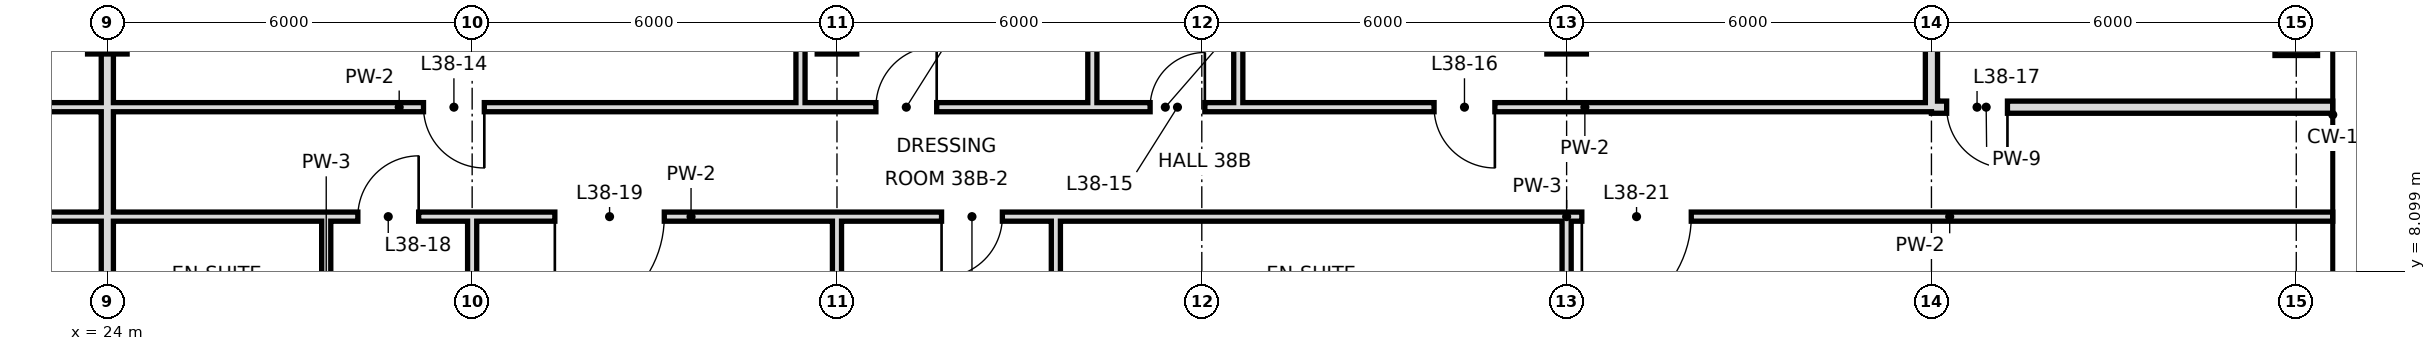
"""IFC4 building model, lengths in metres.
Left out: names, types, materials, properties, quantities, classifications, styles, units other than length and angle.
Written with IfcOpenShell. Run it as: python <this file> out.ifc"""

import sys

from ifc_helpers import new_model, si_unit, direction, frame, frame_2d, origin, origin_2d, place, context, subcontext, project, spatial, rectangle, hollow_rectangle, extrude, element, fill, save


model = new_model("IFC4")
c1 = context("Model", 3, precision=1e-05, world=origin(), true_north=direction((0.0, 1.0)))
c2 = subcontext(c1, "Body", "Model", "MODEL_VIEW")
j1 = project(units=[si_unit("LENGTHUNIT", "METRE"), si_unit("PLANEANGLEUNIT", "RADIAN")], contexts=[c1])
p1 = place(None, origin())
s1 = spatial("IfcSite", under=j1, at=p1, CompositionType="ELEMENT")
p2 = place(p1, origin())
s2 = spatial("IfcBuilding", under=s1, at=p2, CompositionType="ELEMENT")
p3 = place(p2, frame((0.0, 0.0, 167.2)))
s3 = spatial("IfcBuildingStorey", under=s2, at=p3, CompositionType="ELEMENT", Elevation=167.2)
for number, where, z_axis, x_axis in (
    (1, (24.0, 12.0, 0.0), (0.0, 0.0, 1.0), (1.0, 0.0, 0.0)),
    (2, (36.0, 12.0, 0.0), (0.0, 0.0, 1.0), (1.0, 0.0, 0.0)),
    (3, (48.0, 12.0, 0.0), (0.0, 0.0, 1.0), (1.0, 0.0, 0.0)),
):
    element("IfcColumn", number, at=place(p3, frame(where, z_axis=z_axis, x_axis=x_axis)), inside=s3, PredefinedType="COLUMN", context=c2, shape_type="SweptSolid", body=[
        extrude(hollow_rectangle(XDim=0.65, YDim=0.65, WallThickness=0.032, at=origin_2d()), origin(), (0.0, 0.0, 1.0), 3.6),
    ])
p4 = place(p3, frame((60.0, 12.0, 0.0), z_axis=(0.0, 0.0, 1.0), x_axis=(1.0, 0.0, 0.0)))
e4 = element("IfcColumn", 4, at=p4, inside=s3, PredefinedType="COLUMN", context=c2, shape_type="SweptSolid", body=[
    extrude(hollow_rectangle(XDim=0.7, YDim=0.7, WallThickness=0.036, at=origin_2d()), origin(), (0.0, 0.0, 1.0), 3.6),
])
p5 = place(p3, frame((24.0, 0.0, 0.0), z_axis=(0.0, 0.0, 1.0), x_axis=(0.0, 1.0, 0.0)))
e5 = element("IfcWall", 5, at=p5, inside=s3, PredefinedType="SOLIDWALL", context=c2, shape_type="SweptSolid", body=[
    extrude(rectangle(XDim=15.3, YDim=0.2, at=frame_2d((7.65, 0.0))), origin(), (0.0, 0.0, 1.0), 2.72),
])
p6 = place(p3, frame((27.6, 6.0, 0.0), z_axis=(0.0, 0.0, 1.0), x_axis=(0.0, 1.0, 0.0)))
e6 = element("IfcWall", 6, at=p6, inside=s3, PredefinedType="PARTITIONING", context=c2, shape_type="SweptSolid", body=[
    extrude(rectangle(XDim=3.0, YDim=0.15, at=frame_2d((1.5, 0.0))), origin(), (0.0, 0.0, 1.0), 3.42),
])
p7 = place(p3, frame((30.0, -0.6, 0.0), z_axis=(0.0, 0.0, 1.0), x_axis=(0.0, 1.0, 0.0)))
e7 = element("IfcWall", 7, at=p7, inside=s3, PredefinedType="PARTITIONING", context=c2, shape_type="SweptSolid", body=[
    extrude(rectangle(XDim=9.6, YDim=0.15, at=frame_2d((4.8, 0.0))), origin(), (0.0, 0.0, 1.0), 2.72),
])
p8 = place(p3, frame((35.4, 10.8, 0.0), z_axis=(0.0, 0.0, 1.0), x_axis=(0.0, 1.0, 0.0)))
e8 = element("IfcWall", 8, at=p8, inside=s3, PredefinedType="PARTITIONING", context=c2, shape_type="SweptSolid", body=[
    extrude(rectangle(XDim=4.5, YDim=0.15, at=frame_2d((2.25, 0.0))), origin(), (0.0, 0.0, 1.0), 3.42),
])
p9 = place(p3, frame((36.0, 0.0, 0.0), z_axis=(0.0, 0.0, 1.0), x_axis=(0.0, 1.0, 0.0)))
e9 = element("IfcWall", 9, at=p9, inside=s3, PredefinedType="PARTITIONING", context=c2, shape_type="SweptSolid", body=[
    extrude(rectangle(XDim=9.0, YDim=0.15, at=frame_2d((4.5, 0.0))), origin(), (0.0, 0.0, 1.0), 2.72),
])
p10 = place(p3, frame((39.6, 6.0, 0.0), z_axis=(0.0, 0.0, 1.0), x_axis=(0.0, 1.0, 0.0)))
e10 = element("IfcWall", 10, at=p10, inside=s3, PredefinedType="PARTITIONING", context=c2, shape_type="SweptSolid", body=[
    extrude(rectangle(XDim=3.0, YDim=0.15, at=frame_2d((1.5, 0.0))), origin(), (0.0, 0.0, 1.0), 3.42),
])
for number, where, z_axis, x_axis in (
    (11, (40.2, 10.8, 0.0), (0.0, 0.0, 1.0), (0.0, 1.0, 0.0)),
    (12, (42.6, 10.8, 0.0), (0.0, 0.0, 1.0), (0.0, 1.0, 0.0)),
):
    element("IfcWall", number, at=place(p3, frame(where, z_axis=z_axis, x_axis=x_axis)), inside=s3, PredefinedType="PARTITIONING", context=c2, shape_type="SweptSolid", body=[
        extrude(rectangle(XDim=4.5, YDim=0.15, at=frame_2d((2.25, 0.0))), origin(), (0.0, 0.0, 1.0), 3.42),
    ])
p11 = place(p3, frame((48.0, 6.0, 0.0), z_axis=(0.0, 0.0, 1.0), x_axis=(0.0, 1.0, 0.0)))
e13 = element("IfcWall", 13, at=p11, inside=s3, PredefinedType="PARTITIONING", context=c2, shape_type="SweptSolid", body=[
    extrude(rectangle(XDim=3.0, YDim=0.15, at=frame_2d((1.5, 0.0))), origin(), (0.0, 0.0, 1.0), 2.72),
])
p12 = place(p3, frame((54.0, 10.8, 0.0), z_axis=(0.0, 0.0, 1.0), x_axis=(0.0, 1.0, 0.0)))
e14 = element("IfcWall", 14, at=p12, inside=s3, PredefinedType="SOLIDWALL", context=c2, shape_type="SweptSolid", body=[
    extrude(rectangle(XDim=4.8, YDim=0.2, at=frame_2d((2.4, 0.0))), origin(), (0.0, 0.0, 1.0), 2.72),
])
p13 = place(p3, frame((54.0, 10.8, 0.0), z_axis=(0.0, 0.0, 1.0), x_axis=(1.0, 0.0, 0.0)))
e15 = element("IfcWall", 15, at=p13, inside=s3, PredefinedType="SOLIDWALL", context=c2, shape_type="SweptSolid", body=[
    extrude(rectangle(XDim=6.6, YDim=0.2, at=frame_2d((3.3, 0.0))), origin(), (0.0, 0.0, 1.0), 2.97),
])
p14 = place(p13, frame((0.25, 0.0, 0.0)))
e16 = element("IfcOpeningElement", 16, at=p14, cuts=e15, PredefinedType="OPENING", context=c2, shape_type="SweptSolid", body=[
    extrude(rectangle(XDim=1.0, YDim=2.4, at=frame_2d((0.5, 1.2))), frame((0.0, 0.11, 0.0), z_axis=(0.0, -1.0, 0.0), x_axis=(1.0, 0.0, 0.0)), (0.0, 0.0, 1.0), 0.22),
])
p15 = place(p3, frame((17.4, 10.8, 0.0), z_axis=(0.0, 0.0, 1.0), x_axis=(1.0, 0.0, 0.0)))
e17 = element("IfcWall", 17, at=p15, inside=s3, PredefinedType="PARTITIONING", context=c2, shape_type="SweptSolid", body=[
    extrude(rectangle(XDim=22.8, YDim=0.15, at=frame_2d((11.4, 0.0))), origin(), (0.0, 0.0, 1.0), 3.42),
])
p16 = place(p15, frame((2.8, 0.0, 0.0)))
e18 = element("IfcOpeningElement", 18, at=p16, cuts=e17, PredefinedType="OPENING", context=c2, shape_type="SweptSolid", body=[
    extrude(rectangle(XDim=1.0, YDim=2.4, at=frame_2d((0.5, 1.2))), frame((0.0, 0.085, 0.0), z_axis=(0.0, -1.0, 0.0), x_axis=(1.0, 0.0, 0.0)), (0.0, 0.0, 1.0), 0.17),
])
p17 = place(p15, frame((19.24, 0.0, 0.0)))
e19 = element("IfcOpeningElement", 19, at=p17, cuts=e17, PredefinedType="OPENING", context=c2, shape_type="SweptSolid", body=[
    extrude(rectangle(XDim=1.0, YDim=2.4, at=frame_2d((0.5, 1.2))), frame((0.0, 0.085, 0.0), z_axis=(0.0, -1.0, 0.0), x_axis=(1.0, 0.0, 0.0)), (0.0, 0.0, 1.0), 0.17),
])
p18 = place(p15, frame((11.8, 0.0, 0.0)))
e20 = element("IfcOpeningElement", 20, at=p18, cuts=e17, PredefinedType="OPENING", context=c2, shape_type="SweptSolid", body=[
    extrude(rectangle(XDim=1.0, YDim=2.4, at=frame_2d((0.5, 1.2))), frame((0.0, 0.085, 0.0), z_axis=(0.0, -1.0, 0.0), x_axis=(1.0, 0.0, 0.0)), (0.0, 0.0, 1.0), 0.17),
])
p19 = place(p3, frame((42.6, 10.8, 0.0), z_axis=(0.0, 0.0, 1.0), x_axis=(1.0, 0.0, 0.0)))
e21 = element("IfcWall", 21, at=p19, inside=s3, PredefinedType="PARTITIONING", context=c2, shape_type="SweptSolid", body=[
    extrude(rectangle(XDim=11.4, YDim=0.15, at=frame_2d((5.7, 0.0))), origin(), (0.0, 0.0, 1.0), 3.42),
])
p20 = place(p19, frame((3.22, 0.0, 0.0)))
e22 = element("IfcOpeningElement", 22, at=p20, cuts=e21, PredefinedType="OPENING", context=c2, shape_type="SweptSolid", body=[
    extrude(rectangle(XDim=1.0, YDim=2.4, at=frame_2d((0.5, 1.2))), frame((0.0, 0.085, 0.0), z_axis=(0.0, -1.0, 0.0), x_axis=(1.0, 0.0, 0.0)), (0.0, 0.0, 1.0), 0.17),
])
p21 = place(p3, frame((40.2, 10.8, 0.0), z_axis=(0.0, 0.0, 1.0), x_axis=(1.0, 0.0, 0.0)))
e23 = element("IfcWall", 23, at=p21, inside=s3, PredefinedType="PARTITIONING", context=c2, shape_type="SweptSolid", body=[
    extrude(rectangle(XDim=2.4, YDim=0.15, at=frame_2d((1.2, 0.0))), origin(), (0.0, 0.0, 1.0), 3.42),
])
p22 = place(p21, frame((0.95, 0.0, 0.0)))
e24 = element("IfcOpeningElement", 24, at=p22, cuts=e23, PredefinedType="OPENING", context=c2, shape_type="SweptSolid", body=[
    extrude(rectangle(XDim=0.9, YDim=2.4, at=frame_2d((0.45, 1.2))), frame((0.0, 0.085, 0.0), z_axis=(0.0, -1.0, 0.0), x_axis=(1.0, 0.0, 0.0)), (0.0, 0.0, 1.0), 0.17),
])
p23 = place(p3, frame((6.0, 9.0, 0.0), z_axis=(0.0, 0.0, 1.0), x_axis=(1.0, 0.0, 0.0)))
e25 = element("IfcWall", 25, at=p23, inside=s3, PredefinedType="PARTITIONING", context=c2, shape_type="SweptSolid", body=[
    extrude(rectangle(XDim=18.0, YDim=0.15, at=frame_2d((9.0, 0.0))), origin(), (0.0, 0.0, 1.0), 3.42),
])
p24 = place(p23, frame((3.4, 0.0, 0.0)))
e26 = element("IfcOpeningElement", 26, at=p24, cuts=e25, PredefinedType="OPENING", context=c2, shape_type="SweptSolid", body=[
    extrude(rectangle(XDim=1.0, YDim=2.4, at=frame_2d((0.5, 1.2))), frame((0.0, 0.085, 0.0), z_axis=(0.0, -1.0, 0.0), x_axis=(1.0, 0.0, 0.0)), (0.0, 0.0, 1.0), 0.17),
])
p25 = place(p23, frame((9.16, 0.0, 0.0)))
e27 = element("IfcOpeningElement", 27, at=p25, cuts=e25, PredefinedType="OPENING", context=c2, shape_type="SweptSolid", body=[
    extrude(rectangle(XDim=1.8, YDim=2.4, at=frame_2d((0.9, 1.2))), frame((0.0, 0.085, 0.0), z_axis=(0.0, -1.0, 0.0), x_axis=(1.0, 0.0, 0.0)), (0.0, 0.0, 1.0), 0.17),
])
p26 = place(p3, frame((27.6, 9.0, 0.0), z_axis=(0.0, 0.0, 1.0), x_axis=(1.0, 0.0, 0.0)))
e28 = element("IfcWall", 28, at=p26, inside=s3, PredefinedType="PARTITIONING", context=c2, shape_type="SweptSolid", body=[
    extrude(rectangle(XDim=12.0, YDim=0.15, at=frame_2d((6.0, 0.0))), origin(), (0.0, 0.0, 1.0), 3.42),
])
p27 = place(p26, frame((0.52, 0.0, 0.0)))
e29 = element("IfcOpeningElement", 29, at=p27, cuts=e28, PredefinedType="OPENING", context=c2, shape_type="SweptSolid", body=[
    extrude(rectangle(XDim=1.0, YDim=2.4, at=frame_2d((0.5, 1.2))), frame((0.0, 0.085, 0.0), z_axis=(0.0, -1.0, 0.0), x_axis=(1.0, 0.0, 0.0)), (0.0, 0.0, 1.0), 0.17),
])
p28 = place(p26, frame((3.76, 0.0, 0.0)))
e30 = element("IfcOpeningElement", 30, at=p28, cuts=e28, PredefinedType="OPENING", context=c2, shape_type="SweptSolid", body=[
    extrude(rectangle(XDim=1.8, YDim=2.4, at=frame_2d((0.9, 1.2))), frame((0.0, 0.085, 0.0), z_axis=(0.0, -1.0, 0.0), x_axis=(1.0, 0.0, 0.0)), (0.0, 0.0, 1.0), 0.17),
])
p29 = place(p26, frame((10.12, 0.0, 0.0)))
e31 = element("IfcOpeningElement", 31, at=p29, cuts=e28, PredefinedType="OPENING", context=c2, shape_type="SweptSolid", body=[
    extrude(rectangle(XDim=1.0, YDim=2.4, at=frame_2d((0.5, 1.2))), frame((0.0, 0.085, 0.0), z_axis=(0.0, -1.0, 0.0), x_axis=(1.0, 0.0, 0.0)), (0.0, 0.0, 1.0), 0.17),
])
p30 = place(p3, frame((48.0, 9.0, 0.0), z_axis=(0.0, 0.0, 1.0), x_axis=(1.0, 0.0, 0.0)))
e32 = element("IfcWall", 32, at=p30, inside=s3, PredefinedType="PARTITIONING", context=c2, shape_type="SweptSolid", body=[
    extrude(rectangle(XDim=12.6, YDim=0.15, at=frame_2d((6.3, 0.0))), origin(), (0.0, 0.0, 1.0), 3.42),
])
p31 = place(p30, frame((0.25, 0.0, 0.0)))
e33 = element("IfcOpeningElement", 33, at=p31, cuts=e32, PredefinedType="OPENING", context=c2, shape_type="SweptSolid", body=[
    extrude(rectangle(XDim=1.8, YDim=2.4, at=frame_2d((0.9, 1.2))), frame((0.0, 0.085, 0.0), z_axis=(0.0, -1.0, 0.0), x_axis=(1.0, 0.0, 0.0)), (0.0, 0.0, 1.0), 0.17),
])
p32 = place(p3, frame((24.0, 9.0, 0.0), z_axis=(0.0, 0.0, 1.0), x_axis=(1.0, 0.0, 0.0)))
e34 = element("IfcWall", 34, at=p32, inside=s3, PredefinedType="PARTITIONING", context=c2, shape_type="SweptSolid", body=[
    extrude(rectangle(XDim=3.6, YDim=0.15, at=frame_2d((1.8, 0.0))), origin(), (0.0, 0.0, 1.0), 3.42),
])
p33 = place(p3, frame((39.6, 9.0, 0.0), z_axis=(0.0, 0.0, 1.0), x_axis=(1.0, 0.0, 0.0)))
e35 = element("IfcWall", 35, at=p33, inside=s3, PredefinedType="PARTITIONING", context=c2, shape_type="SweptSolid", body=[
    extrude(rectangle(XDim=8.4, YDim=0.15, at=frame_2d((4.2, 0.0))), origin(), (0.0, 0.0, 1.0), 3.42),
])
p34 = place(p17, frame((1.0, 0.0, 0.0), z_axis=(0.0, 0.0, 1.0), x_axis=(-1.0, 0.0, 0.0)))
e36 = element("IfcDoor", 36, at=p34, inside=s3, OperationType="SINGLE_SWING_LEFT", PredefinedType="DOOR", context=c2, shape_type="SweptSolid", body=[
    extrude(rectangle(XDim=1.0, YDim=2.4, at=frame_2d((0.5, 1.2))), frame((0.0, 0.025, 0.0), z_axis=(0.0, -1.0, 0.0), x_axis=(1.0, 0.0, 0.0)), (0.0, 0.0, 1.0), 0.05),
])
fill(e19, e36)
p35 = place(p18, origin())
e37 = element("IfcDoor", 37, at=p35, inside=s3, OperationType="SINGLE_SWING_RIGHT", PredefinedType="DOOR", context=c2, shape_type="SweptSolid", body=[
    extrude(rectangle(XDim=1.0, YDim=2.4, at=frame_2d((0.5, 1.2))), frame((0.0, 0.025, 0.0), z_axis=(0.0, -1.0, 0.0), x_axis=(1.0, 0.0, 0.0)), (0.0, 0.0, 1.0), 0.05),
])
fill(e20, e37)
p36 = place(p22, frame((0.9, 0.0, 0.0), z_axis=(0.0, 0.0, 1.0), x_axis=(-1.0, 0.0, 0.0)))
e38 = element("IfcDoor", 38, at=p36, inside=s3, OperationType="SINGLE_SWING_LEFT", PredefinedType="DOOR", context=c2, shape_type="SweptSolid", body=[
    extrude(rectangle(XDim=0.9, YDim=2.4, at=frame_2d((0.45, 1.2))), frame((0.0, 0.025, 0.0), z_axis=(0.0, -1.0, 0.0), x_axis=(1.0, 0.0, 0.0)), (0.0, 0.0, 1.0), 0.05),
])
fill(e24, e38)
p37 = place(p20, origin())
e39 = element("IfcDoor", 39, at=p37, inside=s3, OperationType="SINGLE_SWING_RIGHT", PredefinedType="DOOR", context=c2, shape_type="SweptSolid", body=[
    extrude(rectangle(XDim=1.0, YDim=2.4, at=frame_2d((0.5, 1.2))), frame((0.0, 0.025, 0.0), z_axis=(0.0, -1.0, 0.0), x_axis=(1.0, 0.0, 0.0)), (0.0, 0.0, 1.0), 0.05),
])
fill(e22, e39)
p38 = place(p14, origin())
e40 = element("IfcDoor", 40, at=p38, inside=s3, OperationType="SINGLE_SWING_RIGHT", PredefinedType="DOOR", context=c2, shape_type="SweptSolid", body=[
    extrude(rectangle(XDim=1.0, YDim=2.4, at=frame_2d((0.5, 1.2))), frame((0.0, 0.025, 0.0), z_axis=(0.0, -1.0, 0.0), x_axis=(1.0, 0.0, 0.0)), (0.0, 0.0, 1.0), 0.05),
])
fill(e16, e40)
p39 = place(p27, frame((1.0, 0.0, 0.0), z_axis=(0.0, 0.0, 1.0), x_axis=(-1.0, 0.0, 0.0)))
e41 = element("IfcDoor", 41, at=p39, inside=s3, OperationType="SINGLE_SWING_LEFT", PredefinedType="DOOR", context=c2, shape_type="SweptSolid", body=[
    extrude(rectangle(XDim=1.0, YDim=2.4, at=frame_2d((0.5, 1.2))), frame((0.0, 0.025, 0.0), z_axis=(0.0, -1.0, 0.0), x_axis=(1.0, 0.0, 0.0)), (0.0, 0.0, 1.0), 0.05),
])
fill(e29, e41)
p40 = place(p28, frame((1.8, 0.0, 0.0), z_axis=(0.0, 0.0, 1.0), x_axis=(-1.0, 0.0, 0.0)))
e42 = element("IfcDoor", 42, at=p40, inside=s3, OperationType="SINGLE_SWING_RIGHT", PredefinedType="DOOR", context=c2, shape_type="SweptSolid", body=[
    extrude(rectangle(XDim=1.8, YDim=2.4, at=frame_2d((0.9, 1.2))), frame((0.0, 0.025, 0.0), z_axis=(0.0, -1.0, 0.0), x_axis=(1.0, 0.0, 0.0)), (0.0, 0.0, 1.0), 0.05),
])
fill(e30, e42)
p41 = place(p29, frame((1.0, 0.0, 0.0), z_axis=(0.0, 0.0, 1.0), x_axis=(-1.0, 0.0, 0.0)))
e43 = element("IfcDoor", 43, at=p41, inside=s3, OperationType="SINGLE_SWING_RIGHT", PredefinedType="DOOR", context=c2, shape_type="SweptSolid", body=[
    extrude(rectangle(XDim=1.0, YDim=2.4, at=frame_2d((0.5, 1.2))), frame((0.0, 0.025, 0.0), z_axis=(0.0, -1.0, 0.0), x_axis=(1.0, 0.0, 0.0)), (0.0, 0.0, 1.0), 0.05),
])
fill(e31, e43)
p42 = place(p31, frame((1.8, 0.0, 0.0), z_axis=(0.0, 0.0, 1.0), x_axis=(-1.0, 0.0, 0.0)))
e44 = element("IfcDoor", 44, at=p42, inside=s3, OperationType="SINGLE_SWING_RIGHT", PredefinedType="DOOR", context=c2, shape_type="SweptSolid", body=[
    extrude(rectangle(XDim=1.8, YDim=2.4, at=frame_2d((0.9, 1.2))), frame((0.0, 0.025, 0.0), z_axis=(0.0, -1.0, 0.0), x_axis=(1.0, 0.0, 0.0)), (0.0, 0.0, 1.0), 0.05),
])
fill(e33, e44)
save(model, sys.argv[1])
